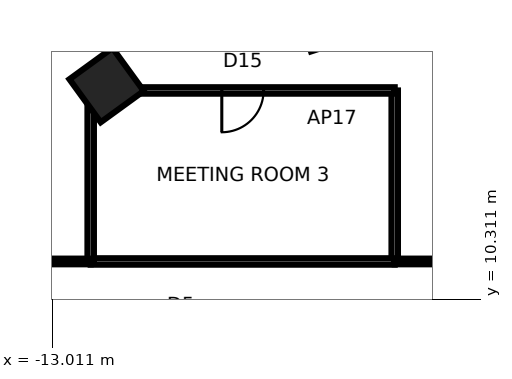
"""IFC4 building model, lengths in metres.
Left out: names, types, materials, properties, quantities, classifications, styles, units other than length and angle.
Written with IfcOpenShell. Run it as: python <this file> out.ifc"""

import sys

from ifc_helpers import new_model, si_unit, direction, frame, frame_2d, origin, origin_2d, place, context, subcontext, project, spatial, rectangle, extrude, element, fill, save


model = new_model("IFC4")
c1 = context("Model", 3, precision=1e-05, world=origin(), true_north=direction((0.0, 1.0)))
c2 = subcontext(c1, "Body", "Model", "MODEL_VIEW")
j1 = project(units=[si_unit("LENGTHUNIT", "METRE"), si_unit("PLANEANGLEUNIT", "RADIAN")], contexts=[c1])
p1 = place(None, origin())
s1 = spatial("IfcSite", under=j1, at=p1, CompositionType="ELEMENT")
p2 = place(p1, origin())
s2 = spatial("IfcBuilding", under=s1, at=p2, CompositionType="ELEMENT")
p3 = place(p2, frame((0.0, 0.0, 176.0)))
s3 = spatial("IfcBuildingStorey", under=s2, at=p3, CompositionType="ELEMENT", Elevation=176.0)
p4 = place(p3, frame((-11.581, 15.94, 0.0), z_axis=(0.0, 0.0, 1.0), x_axis=(-0.587785252292, 0.809016994375, 0.0)))
e1 = element("IfcColumn", 1, at=p4, inside=s3, PredefinedType="COLUMN", context=c2, shape_type="SweptSolid", body=[
    extrude(rectangle(XDim=1.4, YDim=1.4, at=origin_2d()), origin(), (0.0, 0.0, 1.0), 3.9),
])
p5 = place(p3, frame((4.0, 11.3, 0.0), z_axis=(0.0, 0.0, 1.0), x_axis=(-1.0, 0.0, 0.0)))
e2 = element("IfcWall", 2, at=p5, inside=s3, PredefinedType="PARTITIONING", context=c2, shape_type="SweptSolid", body=[
    extrude(rectangle(XDim=8.0, YDim=0.15, at=frame_2d((4.0, 0.0))), origin(), (0.0, 0.0, 1.0), 3.74),
])
p6 = place(p3, frame((-4.0, 11.3, 0.0), z_axis=(0.0, 0.0, 1.0), x_axis=(0.0, 1.0, 0.0)))
e3 = element("IfcWall", 3, at=p6, inside=s3, PredefinedType="PARTITIONING", context=c2, shape_type="SweptSolid", body=[
    extrude(rectangle(XDim=4.5, YDim=0.17, at=frame_2d((2.25, 0.0))), origin(), (0.0, 0.0, 1.0), 3.74),
])
p7 = place(p3, frame((-4.0, 15.8, 0.0), z_axis=(0.0, 0.0, 1.0), x_axis=(-1.0, 0.0, 0.0)))
e4 = element("IfcWall", 4, at=p7, inside=s3, PredefinedType="PARTITIONING", context=c2, shape_type="SweptSolid", body=[
    extrude(rectangle(XDim=8.0, YDim=0.17, at=frame_2d((4.0, 0.0))), origin(), (0.0, 0.0, 1.0), 3.74),
])
p8 = place(p7, frame((3.45, 0.0, 0.0)))
e5 = element("IfcOpeningElement", 5, at=p8, cuts=e4, PredefinedType="OPENING", context=c2, shape_type="SweptSolid", body=[
    extrude(rectangle(XDim=1.1, YDim=2.4, at=frame_2d((0.55, 1.2))), frame((0.0, 0.095, 0.0), z_axis=(0.0, -1.0, 0.0), x_axis=(1.0, 0.0, 0.0)), (0.0, 0.0, 1.0), 0.19),
])
p9 = place(p3, frame((-12.0, 11.3, 0.0), z_axis=(0.0, 0.0, 1.0), x_axis=(1.0, 0.0, 0.0)))
e6 = element("IfcWall", 6, at=p9, inside=s3, PredefinedType="PARTITIONING", context=c2, shape_type="SweptSolid", body=[
    extrude(rectangle(XDim=8.0, YDim=0.17, at=frame_2d((4.0, 0.0))), origin(), (0.0, 0.0, 1.0), 3.74),
])
p10 = place(p3, frame((-12.0, 15.8, 0.0), z_axis=(0.0, 0.0, 1.0), x_axis=(0.0, -1.0, 0.0)))
e7 = element("IfcWall", 7, at=p10, inside=s3, PredefinedType="PARTITIONING", context=c2, shape_type="SweptSolid", body=[
    extrude(rectangle(XDim=4.5, YDim=0.17, at=frame_2d((2.25, 0.0))), origin(), (0.0, 0.0, 1.0), 3.74),
])
p11 = place(p3, frame((-12.0, 11.3, 0.0), z_axis=(0.0, 0.0, 1.0), x_axis=(-1.0, 0.0, 0.0)))
e8 = element("IfcWall", 8, at=p11, inside=s3, PredefinedType="PARTITIONING", context=c2, shape_type="SweptSolid", body=[
    extrude(rectangle(XDim=4.0, YDim=0.15, at=frame_2d((2.0, 0.0))), origin(), (0.0, 0.0, 1.0), 3.74),
])
p12 = place(p8, origin())
e9 = element("IfcDoor", 9, at=p12, inside=s3, OperationType="SINGLE_SWING_RIGHT", PredefinedType="DOOR", context=c2, shape_type="SweptSolid", body=[
    extrude(rectangle(XDim=1.1, YDim=2.4, at=frame_2d((0.55, 1.2))), frame((0.0, 0.025, 0.0), z_axis=(0.0, -1.0, 0.0), x_axis=(1.0, 0.0, 0.0)), (0.0, 0.0, 1.0), 0.05),
])
fill(e5, e9)
save(model, sys.argv[1])
